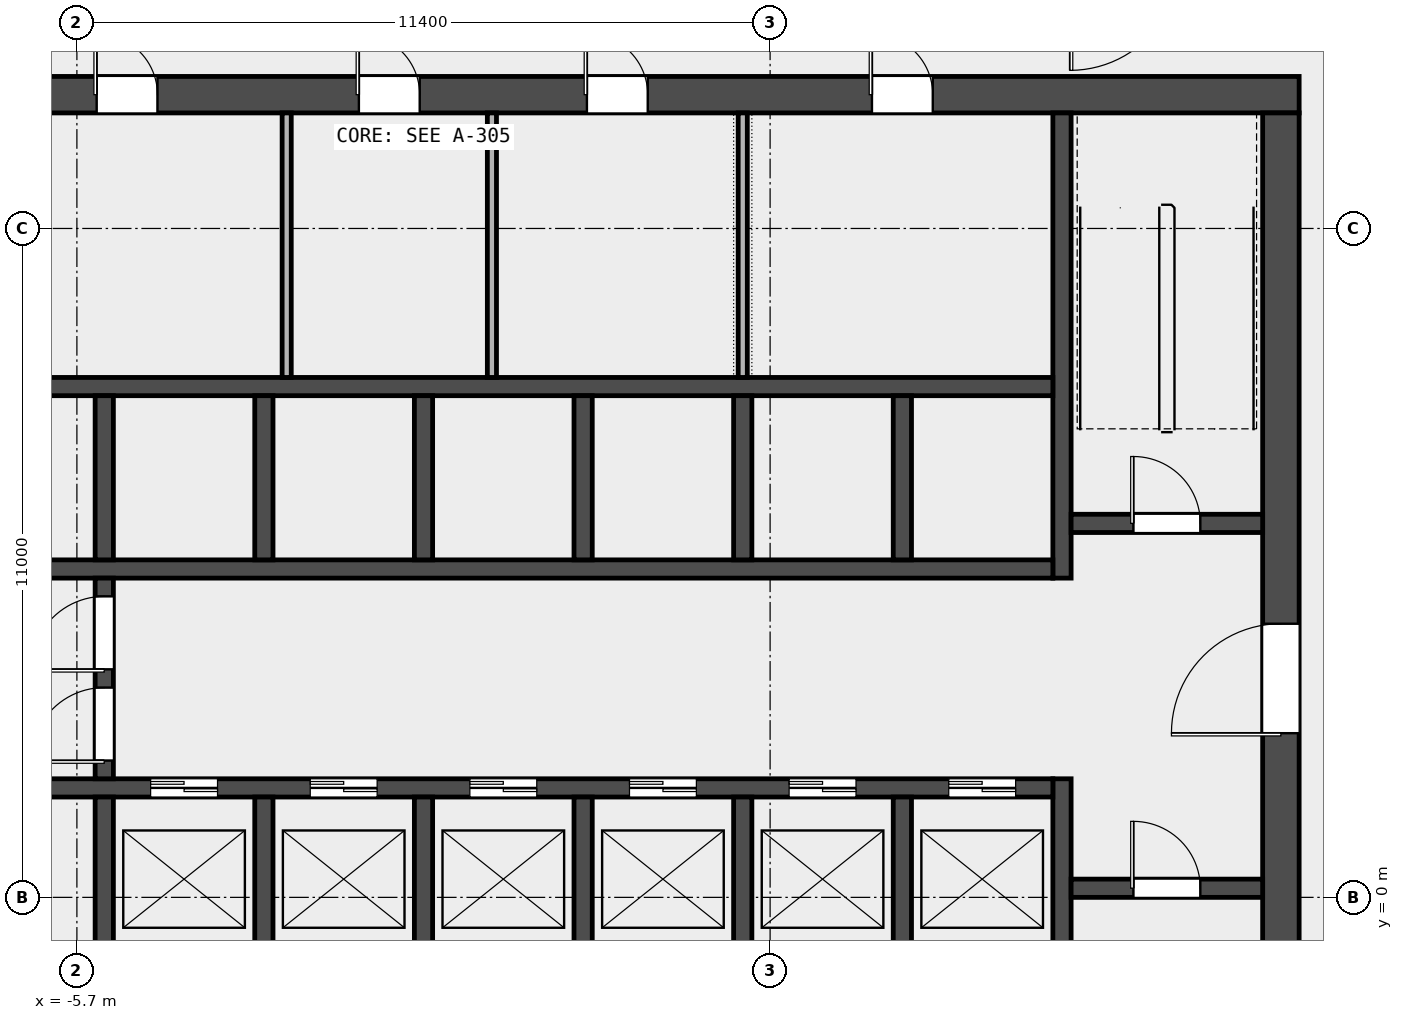
"""IFC4 building model, lengths in metres.
Left out: names, types, materials, properties, quantities, classifications, styles, units other than length and angle.
Written with IfcOpenShell. Run it as: python <this file> out.ifc"""

import sys

from ifc_helpers import new_model, si_unit, direction, frame, frame_2d, origin, place, context, subcontext, project, spatial, rectangle, extrude, element, fill, save


model = new_model("IFC4")
c1 = context("Model", 3, precision=1e-05, world=origin(), true_north=direction((0.0, 1.0)))
c2 = subcontext(c1, "Body", "Model", "MODEL_VIEW")
j1 = project(units=[si_unit("LENGTHUNIT", "METRE"), si_unit("PLANEANGLEUNIT", "RADIAN")], contexts=[c1])
p1 = place(None, origin())
s1 = spatial("IfcSite", under=j1, at=p1, CompositionType="ELEMENT")
p2 = place(p1, origin())
s2 = spatial("IfcBuilding", under=s1, at=p2, CompositionType="ELEMENT")
p3 = place(p2, frame((0.0, 0.0, 50.2)))
s3 = spatial("IfcBuildingStorey", under=s2, at=p3, CompositionType="ELEMENT", Elevation=50.2)
p4 = place(p3, frame((-14.4, 13.2, 0.0), z_axis=(0.0, 0.0, 1.0), x_axis=(1.0, 0.0, 0.0)))
e1 = element("IfcWall", 1, at=p4, inside=s3, PredefinedType="SHEAR", context=c2, shape_type="SweptSolid", body=[
    extrude(rectangle(XDim=28.8, YDim=0.6, at=frame_2d((14.4, 0.0))), origin(), (0.0, 0.0, 1.0), 4.5),
])
p5 = place(p4, frame((4.9, 0.0, 0.0)))
e2 = element("IfcOpeningElement", 2, at=p5, cuts=e1, PredefinedType="OPENING", context=c2, shape_type="SweptSolid", body=[
    extrude(rectangle(XDim=1.0, YDim=2.1, at=frame_2d((0.5, 1.05))), frame((0.0, 0.312, 0.0), z_axis=(0.0, -1.0, 0.0), x_axis=(1.0, 0.0, 0.0)), (0.0, 0.0, 1.0), 0.624),
])
p6 = place(p4, frame((9.025, 0.0, 0.0)))
e3 = element("IfcOpeningElement", 3, at=p6, cuts=e1, PredefinedType="OPENING", context=c2, shape_type="SweptSolid", body=[
    extrude(rectangle(XDim=1.0, YDim=2.1, at=frame_2d((0.5, 1.05))), frame((0.0, 0.312, 0.0), z_axis=(0.0, -1.0, 0.0), x_axis=(1.0, 0.0, 0.0)), (0.0, 0.0, 1.0), 0.624),
])
p7 = place(p4, frame((13.337, 0.0, 0.0)))
e4 = element("IfcOpeningElement", 4, at=p7, cuts=e1, PredefinedType="OPENING", context=c2, shape_type="SweptSolid", body=[
    extrude(rectangle(XDim=1.0, YDim=2.1, at=frame_2d((0.5, 1.05))), frame((0.0, 0.312, 0.0), z_axis=(0.0, -1.0, 0.0), x_axis=(1.0, 0.0, 0.0)), (0.0, 0.0, 1.0), 0.624),
])
p8 = place(p4, frame((17.087, 0.0, 0.0)))
e5 = element("IfcOpeningElement", 5, at=p8, cuts=e1, PredefinedType="OPENING", context=c2, shape_type="SweptSolid", body=[
    extrude(rectangle(XDim=1.0, YDim=2.1, at=frame_2d((0.5, 1.05))), frame((0.0, 0.312, 0.0), z_axis=(0.0, -1.0, 0.0), x_axis=(1.0, 0.0, 0.0)), (0.0, 0.0, 1.0), 0.624),
])
p9 = place(p4, frame((21.775, 0.0, 0.0)))
e6 = element("IfcOpeningElement", 6, at=p9, cuts=e1, PredefinedType="OPENING", context=c2, shape_type="SweptSolid", body=[
    extrude(rectangle(XDim=1.0, YDim=2.1, at=frame_2d((0.5, 1.05))), frame((0.0, 0.312, 0.0), z_axis=(0.0, -1.0, 0.0), x_axis=(1.0, 0.0, 0.0)), (0.0, 0.0, 1.0), 0.624),
])
p10 = place(p3, frame((14.1, -6.6, 0.0), z_axis=(0.0, 0.0, 1.0), x_axis=(0.0, 1.0, 0.0)))
e7 = element("IfcWall", 7, at=p10, inside=s3, PredefinedType="SHEAR", context=c2, shape_type="SweptSolid", body=[
    extrude(rectangle(XDim=19.5, YDim=0.6, at=frame_2d((9.75, 0.0))), origin(), (0.0, 0.0, 1.0), 4.5),
])
p11 = place(p10, frame((9.3, 0.0, 0.0)))
e8 = element("IfcOpeningElement", 8, at=p11, cuts=e7, PredefinedType="OPENING", context=c2, shape_type="SweptSolid", body=[
    extrude(rectangle(XDim=1.8, YDim=2.1, at=frame_2d((0.9, 1.05))), frame((0.0, 0.312, 0.0), z_axis=(0.0, -1.0, 0.0), x_axis=(1.0, 0.0, 0.0)), (0.0, 0.0, 1.0), 0.624),
])
p12 = place(p3, frame((10.5, -6.6, 0.0), z_axis=(0.0, 0.0, 1.0), x_axis=(0.0, 1.0, 0.0)))
e9 = element("IfcWall", 9, at=p12, inside=s3, PredefinedType="SHEAR", context=c2, shape_type="SweptSolid", body=[
    extrude(rectangle(XDim=8.55, YDim=0.3, at=frame_2d((4.275, 0.0))), origin(), (0.0, 0.0, 1.0), 4.5),
])
p13 = place(p3, frame((10.5, 5.25, 0.0), z_axis=(0.0, 0.0, 1.0), x_axis=(0.0, 1.0, 0.0)))
e10 = element("IfcWall", 10, at=p13, inside=s3, PredefinedType="SHEAR", context=c2, shape_type="SweptSolid", body=[
    extrude(rectangle(XDim=7.65, YDim=0.3, at=frame_2d((3.825, 0.0))), origin(), (0.0, 0.0, 1.0), 4.5),
])
p14 = place(p3, frame((10.65, 0.15, 0.0), z_axis=(0.0, 0.0, 1.0), x_axis=(1.0, 0.0, 0.0)))
e11 = element("IfcWall", 11, at=p14, inside=s3, PredefinedType="SOLIDWALL", context=c2, shape_type="SweptSolid", body=[
    extrude(rectangle(XDim=3.15, YDim=0.3, at=frame_2d((1.575, 0.0))), origin(), (0.0, 0.0, 1.0), 4.5),
])
p15 = place(p14, frame((1.025, 0.0, 0.0)))
e12 = element("IfcOpeningElement", 12, at=p15, cuts=e11, PredefinedType="OPENING", context=c2, shape_type="SweptSolid", body=[
    extrude(rectangle(XDim=1.1, YDim=2.1, at=frame_2d((0.55, 1.05))), frame((0.0, 0.162, 0.0), z_axis=(0.0, -1.0, 0.0), x_axis=(1.0, 0.0, 0.0)), (0.0, 0.0, 1.0), 0.324),
])
p16 = place(p3, frame((10.65, 6.15, 0.0), z_axis=(0.0, 0.0, 1.0), x_axis=(1.0, 0.0, 0.0)))
e13 = element("IfcWall", 13, at=p16, inside=s3, PredefinedType="SOLIDWALL", context=c2, shape_type="SweptSolid", body=[
    extrude(rectangle(XDim=3.15, YDim=0.3, at=frame_2d((1.575, 0.0))), origin(), (0.0, 0.0, 1.0), 4.5),
])
p17 = place(p16, frame((1.025, 0.0, 0.0)))
e14 = element("IfcOpeningElement", 14, at=p17, cuts=e13, PredefinedType="OPENING", context=c2, shape_type="SweptSolid", body=[
    extrude(rectangle(XDim=1.1, YDim=2.1, at=frame_2d((0.55, 1.05))), frame((0.0, 0.162, 0.0), z_axis=(0.0, -1.0, 0.0), x_axis=(1.0, 0.0, 0.0)), (0.0, 0.0, 1.0), 0.324),
])
p18 = place(p3, frame((-10.35, 1.8, 0.0), z_axis=(0.0, 0.0, 1.0), x_axis=(1.0, 0.0, 0.0)))
e15 = element("IfcWall", 15, at=p18, inside=s3, PredefinedType="SOLIDWALL", context=c2, shape_type="SweptSolid", body=[
    extrude(rectangle(XDim=20.7, YDim=0.3, at=frame_2d((10.35, 0.0))), origin(), (0.0, 0.0, 1.0), 4.5),
])
p19 = place(p18, frame((0.512, 0.0, 0.0)))
e16 = element("IfcOpeningElement", 16, at=p19, cuts=e15, PredefinedType="OPENING", context=c2, shape_type="SweptSolid", body=[
    extrude(rectangle(XDim=1.3, YDim=2.1, at=frame_2d((0.65, 1.05))), frame((0.0, 0.162, 0.0), z_axis=(0.0, -1.0, 0.0), x_axis=(1.0, 0.0, 0.0)), (0.0, 0.0, 1.0), 0.324),
])
p20 = place(p18, frame((5.863, 0.0, 0.0)))
e17 = element("IfcOpeningElement", 17, at=p20, cuts=e15, PredefinedType="OPENING", context=c2, shape_type="SweptSolid", body=[
    extrude(rectangle(XDim=1.1, YDim=2.1, at=frame_2d((0.55, 1.05))), frame((0.0, 0.162, 0.0), z_axis=(0.0, -1.0, 0.0), x_axis=(1.0, 0.0, 0.0)), (0.0, 0.0, 1.0), 0.324),
])
p21 = place(p18, frame((8.488, 0.0, 0.0)))
e18 = element("IfcOpeningElement", 18, at=p21, cuts=e15, PredefinedType="OPENING", context=c2, shape_type="SweptSolid", body=[
    extrude(rectangle(XDim=1.1, YDim=2.1, at=frame_2d((0.55, 1.05))), frame((0.0, 0.162, 0.0), z_axis=(0.0, -1.0, 0.0), x_axis=(1.0, 0.0, 0.0)), (0.0, 0.0, 1.0), 0.324),
])
p22 = place(p18, frame((11.113, 0.0, 0.0)))
e19 = element("IfcOpeningElement", 19, at=p22, cuts=e15, PredefinedType="OPENING", context=c2, shape_type="SweptSolid", body=[
    extrude(rectangle(XDim=1.1, YDim=2.1, at=frame_2d((0.55, 1.05))), frame((0.0, 0.162, 0.0), z_axis=(0.0, -1.0, 0.0), x_axis=(1.0, 0.0, 0.0)), (0.0, 0.0, 1.0), 0.324),
])
p23 = place(p18, frame((13.738, 0.0, 0.0)))
e20 = element("IfcOpeningElement", 20, at=p23, cuts=e15, PredefinedType="OPENING", context=c2, shape_type="SweptSolid", body=[
    extrude(rectangle(XDim=1.1, YDim=2.1, at=frame_2d((0.55, 1.05))), frame((0.0, 0.162, 0.0), z_axis=(0.0, -1.0, 0.0), x_axis=(1.0, 0.0, 0.0)), (0.0, 0.0, 1.0), 0.324),
])
p24 = place(p18, frame((16.363, 0.0, 0.0)))
e21 = element("IfcOpeningElement", 21, at=p24, cuts=e15, PredefinedType="OPENING", context=c2, shape_type="SweptSolid", body=[
    extrude(rectangle(XDim=1.1, YDim=2.1, at=frame_2d((0.55, 1.05))), frame((0.0, 0.162, 0.0), z_axis=(0.0, -1.0, 0.0), x_axis=(1.0, 0.0, 0.0)), (0.0, 0.0, 1.0), 0.324),
])
p25 = place(p18, frame((18.988, 0.0, 0.0)))
e22 = element("IfcOpeningElement", 22, at=p25, cuts=e15, PredefinedType="OPENING", context=c2, shape_type="SweptSolid", body=[
    extrude(rectangle(XDim=1.1, YDim=2.1, at=frame_2d((0.55, 1.05))), frame((0.0, 0.162, 0.0), z_axis=(0.0, -1.0, 0.0), x_axis=(1.0, 0.0, 0.0)), (0.0, 0.0, 1.0), 0.324),
])
p26 = place(p3, frame((-10.35, 5.4, 0.0), z_axis=(0.0, 0.0, 1.0), x_axis=(1.0, 0.0, 0.0)))
e23 = element("IfcWall", 23, at=p26, inside=s3, PredefinedType="SOLIDWALL", context=c2, shape_type="SweptSolid", body=[
    extrude(rectangle(XDim=20.7, YDim=0.3, at=frame_2d((10.35, 0.0))), origin(), (0.0, 0.0, 1.0), 4.5),
])
p27 = place(p26, frame((0.512, 0.0, 0.0)))
e24 = element("IfcOpeningElement", 24, at=p27, cuts=e23, PredefinedType="OPENING", context=c2, shape_type="SweptSolid", body=[
    extrude(rectangle(XDim=1.3, YDim=2.1, at=frame_2d((0.65, 1.05))), frame((0.0, 0.162, 0.0), z_axis=(0.0, -1.0, 0.0), x_axis=(1.0, 0.0, 0.0)), (0.0, 0.0, 1.0), 0.324),
])
p28 = place(p3, frame((-10.35, 8.4, 0.0), z_axis=(0.0, 0.0, 1.0), x_axis=(1.0, 0.0, 0.0)))
e25 = element("IfcWall", 25, at=p28, inside=s3, PredefinedType="SOLIDWALL", context=c2, shape_type="SweptSolid", body=[
    extrude(rectangle(XDim=20.7, YDim=0.3, at=frame_2d((10.35, 0.0))), origin(), (0.0, 0.0, 1.0), 4.5),
])
for number, where, z_axis, x_axis in (
    (26, (-5.25, -1.05, 0.0), (0.0, 0.0, 1.0), (0.0, 1.0, 0.0)),
    (27, (-2.625, -1.05, 0.0), (0.0, 0.0, 1.0), (0.0, 1.0, 0.0)),
    (28, (0.0, -1.05, 0.0), (0.0, 0.0, 1.0), (0.0, 1.0, 0.0)),
    (29, (2.625, -1.05, 0.0), (0.0, 0.0, 1.0), (0.0, 1.0, 0.0)),
    (30, (5.25, -1.05, 0.0), (0.0, 0.0, 1.0), (0.0, 1.0, 0.0)),
    (31, (7.875, -1.05, 0.0), (0.0, 0.0, 1.0), (0.0, 1.0, 0.0)),
    (32, (-5.25, 5.55, 0.0), (0.0, 0.0, 1.0), (0.0, 1.0, 0.0)),
    (33, (-2.625, 5.55, 0.0), (0.0, 0.0, 1.0), (0.0, 1.0, 0.0)),
    (34, (0.0, 5.55, 0.0), (0.0, 0.0, 1.0), (0.0, 1.0, 0.0)),
    (35, (2.625, 5.55, 0.0), (0.0, 0.0, 1.0), (0.0, 1.0, 0.0)),
    (36, (5.25, 5.55, 0.0), (0.0, 0.0, 1.0), (0.0, 1.0, 0.0)),
    (37, (7.875, 5.55, 0.0), (0.0, 0.0, 1.0), (0.0, 1.0, 0.0)),
):
    element("IfcWall", number, at=place(p3, frame(where, z_axis=z_axis, x_axis=x_axis)), inside=s3, PredefinedType="SOLIDWALL", context=c2, shape_type="SweptSolid", body=[
        extrude(rectangle(XDim=2.7, YDim=0.3, at=frame_2d((1.35, 0.0))), origin(), (0.0, 0.0, 1.0), 4.5),
    ])
p29 = place(p3, frame((-5.25, 1.95, 0.0), z_axis=(0.0, 0.0, 1.0), x_axis=(0.0, 1.0, 0.0)))
e38 = element("IfcWall", 38, at=p29, inside=s3, PredefinedType="SOLIDWALL", context=c2, shape_type="SweptSolid", body=[
    extrude(rectangle(XDim=3.3, YDim=0.3, at=frame_2d((1.65, 0.0))), origin(), (0.0, 0.0, 1.0), 4.5),
])
p30 = place(p29, frame((0.3, 0.0, 0.0)))
e39 = element("IfcOpeningElement", 39, at=p30, cuts=e38, PredefinedType="OPENING", context=c2, shape_type="SweptSolid", body=[
    extrude(rectangle(XDim=1.2, YDim=2.1, at=frame_2d((0.6, 1.05))), frame((0.0, 0.162, 0.0), z_axis=(0.0, -1.0, 0.0), x_axis=(1.0, 0.0, 0.0)), (0.0, 0.0, 1.0), 0.324),
])
p31 = place(p29, frame((1.8, 0.0, 0.0)))
e40 = element("IfcOpeningElement", 40, at=p31, cuts=e38, PredefinedType="OPENING", context=c2, shape_type="SweptSolid", body=[
    extrude(rectangle(XDim=1.2, YDim=2.1, at=frame_2d((0.6, 1.05))), frame((0.0, 0.162, 0.0), z_axis=(0.0, -1.0, 0.0), x_axis=(1.0, 0.0, 0.0)), (0.0, 0.0, 1.0), 0.324),
])
for number, where, z_axis, x_axis in (
    (41, (-2.25, 8.55, 0.0), (0.0, 0.0, 1.0), (0.0, 1.0, 0.0)),
    (42, (1.125, 8.55, 0.0), (0.0, 0.0, 1.0), (0.0, 1.0, 0.0)),
    (43, (5.25, 8.55, 0.0), (0.0, 0.0, 1.0), (0.0, 1.0, 0.0)),
):
    element("IfcWall", number, at=place(p3, frame(where, z_axis=z_axis, x_axis=x_axis)), inside=s3, PredefinedType="PARTITIONING", context=c2, shape_type="SweptSolid", body=[
        extrude(rectangle(XDim=4.35, YDim=0.15, at=frame_2d((2.175, 0.0))), origin(), (0.0, 0.0, 1.0), 4.5),
    ])
p32 = place(p15, origin())
e44 = element("IfcDoor", 44, at=p32, inside=s3, OperationType="SINGLE_SWING_RIGHT", PredefinedType="DOOR", context=c2, shape_type="SweptSolid", body=[
    extrude(rectangle(XDim=1.1, YDim=2.1, at=frame_2d((0.55, 1.05))), frame((0.0, 0.025, 0.0), z_axis=(0.0, -1.0, 0.0), x_axis=(1.0, 0.0, 0.0)), (0.0, 0.0, 1.0), 0.05),
])
fill(e12, e44)
p33 = place(p17, origin())
e45 = element("IfcDoor", 45, at=p33, inside=s3, OperationType="SINGLE_SWING_RIGHT", PredefinedType="DOOR", context=c2, shape_type="SweptSolid", body=[
    extrude(rectangle(XDim=1.1, YDim=2.1, at=frame_2d((0.55, 1.05))), frame((0.0, 0.025, 0.0), z_axis=(0.0, -1.0, 0.0), x_axis=(1.0, 0.0, 0.0)), (0.0, 0.0, 1.0), 0.05),
])
fill(e14, e45)
p34 = place(p11, origin())
e46 = element("IfcDoor", 46, at=p34, inside=s3, OperationType="DOUBLE_DOOR_SINGLE_SWING", PredefinedType="DOOR", context=c2, shape_type="SweptSolid", body=[
    extrude(rectangle(XDim=1.8, YDim=2.1, at=frame_2d((0.9, 1.05))), frame((0.0, 0.025, 0.0), z_axis=(0.0, -1.0, 0.0), x_axis=(1.0, 0.0, 0.0)), (0.0, 0.0, 1.0), 0.05),
])
fill(e8, e46)
p35 = place(p30, origin())
e47 = element("IfcDoor", 47, at=p35, inside=s3, OperationType="SINGLE_SWING_LEFT", PredefinedType="DOOR", context=c2, shape_type="SweptSolid", body=[
    extrude(rectangle(XDim=1.2, YDim=2.1, at=frame_2d((0.6, 1.05))), frame((0.0, 0.025, 0.0), z_axis=(0.0, -1.0, 0.0), x_axis=(1.0, 0.0, 0.0)), (0.0, 0.0, 1.0), 0.05),
])
fill(e39, e47)
p36 = place(p31, origin())
e48 = element("IfcDoor", 48, at=p36, inside=s3, OperationType="SINGLE_SWING_RIGHT", PredefinedType="DOOR", context=c2, shape_type="SweptSolid", body=[
    extrude(rectangle(XDim=1.2, YDim=2.1, at=frame_2d((0.6, 1.05))), frame((0.0, 0.025, 0.0), z_axis=(0.0, -1.0, 0.0), x_axis=(1.0, 0.0, 0.0)), (0.0, 0.0, 1.0), 0.05),
])
fill(e40, e48)
p37 = place(p20, origin())
e49 = element("IfcDoor", 49, at=p37, inside=s3, OperationType="DOUBLE_DOOR_SLIDING", PredefinedType="DOOR", context=c2, shape_type="SweptSolid", body=[
    extrude(rectangle(XDim=1.1, YDim=2.1, at=frame_2d((0.55, 1.05))), frame((0.0, 0.025, 0.0), z_axis=(0.0, -1.0, 0.0), x_axis=(1.0, 0.0, 0.0)), (0.0, 0.0, 1.0), 0.05),
])
fill(e17, e49)
p38 = place(p21, origin())
e50 = element("IfcDoor", 50, at=p38, inside=s3, OperationType="DOUBLE_DOOR_SLIDING", PredefinedType="DOOR", context=c2, shape_type="SweptSolid", body=[
    extrude(rectangle(XDim=1.1, YDim=2.1, at=frame_2d((0.55, 1.05))), frame((0.0, 0.025, 0.0), z_axis=(0.0, -1.0, 0.0), x_axis=(1.0, 0.0, 0.0)), (0.0, 0.0, 1.0), 0.05),
])
fill(e18, e50)
p39 = place(p22, origin())
e51 = element("IfcDoor", 51, at=p39, inside=s3, OperationType="DOUBLE_DOOR_SLIDING", PredefinedType="DOOR", context=c2, shape_type="SweptSolid", body=[
    extrude(rectangle(XDim=1.1, YDim=2.1, at=frame_2d((0.55, 1.05))), frame((0.0, 0.025, 0.0), z_axis=(0.0, -1.0, 0.0), x_axis=(1.0, 0.0, 0.0)), (0.0, 0.0, 1.0), 0.05),
])
fill(e19, e51)
p40 = place(p23, origin())
e52 = element("IfcDoor", 52, at=p40, inside=s3, OperationType="DOUBLE_DOOR_SLIDING", PredefinedType="DOOR", context=c2, shape_type="SweptSolid", body=[
    extrude(rectangle(XDim=1.1, YDim=2.1, at=frame_2d((0.55, 1.05))), frame((0.0, 0.025, 0.0), z_axis=(0.0, -1.0, 0.0), x_axis=(1.0, 0.0, 0.0)), (0.0, 0.0, 1.0), 0.05),
])
fill(e20, e52)
p41 = place(p24, origin())
e53 = element("IfcDoor", 53, at=p41, inside=s3, OperationType="DOUBLE_DOOR_SLIDING", PredefinedType="DOOR", context=c2, shape_type="SweptSolid", body=[
    extrude(rectangle(XDim=1.1, YDim=2.1, at=frame_2d((0.55, 1.05))), frame((0.0, 0.025, 0.0), z_axis=(0.0, -1.0, 0.0), x_axis=(1.0, 0.0, 0.0)), (0.0, 0.0, 1.0), 0.05),
])
fill(e21, e53)
p42 = place(p25, origin())
e54 = element("IfcDoor", 54, at=p42, inside=s3, OperationType="DOUBLE_DOOR_SLIDING", PredefinedType="DOOR", context=c2, shape_type="SweptSolid", body=[
    extrude(rectangle(XDim=1.1, YDim=2.1, at=frame_2d((0.55, 1.05))), frame((0.0, 0.025, 0.0), z_axis=(0.0, -1.0, 0.0), x_axis=(1.0, 0.0, 0.0)), (0.0, 0.0, 1.0), 0.05),
])
fill(e22, e54)
p43 = place(p6, origin())
e55 = element("IfcDoor", 55, at=p43, inside=s3, OperationType="SINGLE_SWING_LEFT", PredefinedType="DOOR", context=c2, shape_type="SweptSolid", body=[
    extrude(rectangle(XDim=1.0, YDim=2.1, at=frame_2d((0.5, 1.05))), frame((0.0, 0.025, 0.0), z_axis=(0.0, -1.0, 0.0), x_axis=(1.0, 0.0, 0.0)), (0.0, 0.0, 1.0), 0.05),
])
fill(e3, e55)
p44 = place(p7, origin())
e56 = element("IfcDoor", 56, at=p44, inside=s3, OperationType="SINGLE_SWING_LEFT", PredefinedType="DOOR", context=c2, shape_type="SweptSolid", body=[
    extrude(rectangle(XDim=1.0, YDim=2.1, at=frame_2d((0.5, 1.05))), frame((0.0, 0.025, 0.0), z_axis=(0.0, -1.0, 0.0), x_axis=(1.0, 0.0, 0.0)), (0.0, 0.0, 1.0), 0.05),
])
fill(e4, e56)
p45 = place(p8, origin())
e57 = element("IfcDoor", 57, at=p45, inside=s3, OperationType="SINGLE_SWING_LEFT", PredefinedType="DOOR", context=c2, shape_type="SweptSolid", body=[
    extrude(rectangle(XDim=1.0, YDim=2.1, at=frame_2d((0.5, 1.05))), frame((0.0, 0.025, 0.0), z_axis=(0.0, -1.0, 0.0), x_axis=(1.0, 0.0, 0.0)), (0.0, 0.0, 1.0), 0.05),
])
fill(e5, e57)
p46 = place(p9, origin())
e58 = element("IfcDoor", 58, at=p46, inside=s3, OperationType="SINGLE_SWING_LEFT", PredefinedType="DOOR", context=c2, shape_type="SweptSolid", body=[
    extrude(rectangle(XDim=1.0, YDim=2.1, at=frame_2d((0.5, 1.05))), frame((0.0, 0.025, 0.0), z_axis=(0.0, -1.0, 0.0), x_axis=(1.0, 0.0, 0.0)), (0.0, 0.0, 1.0), 0.05),
])
fill(e6, e58)
save(model, sys.argv[1])
